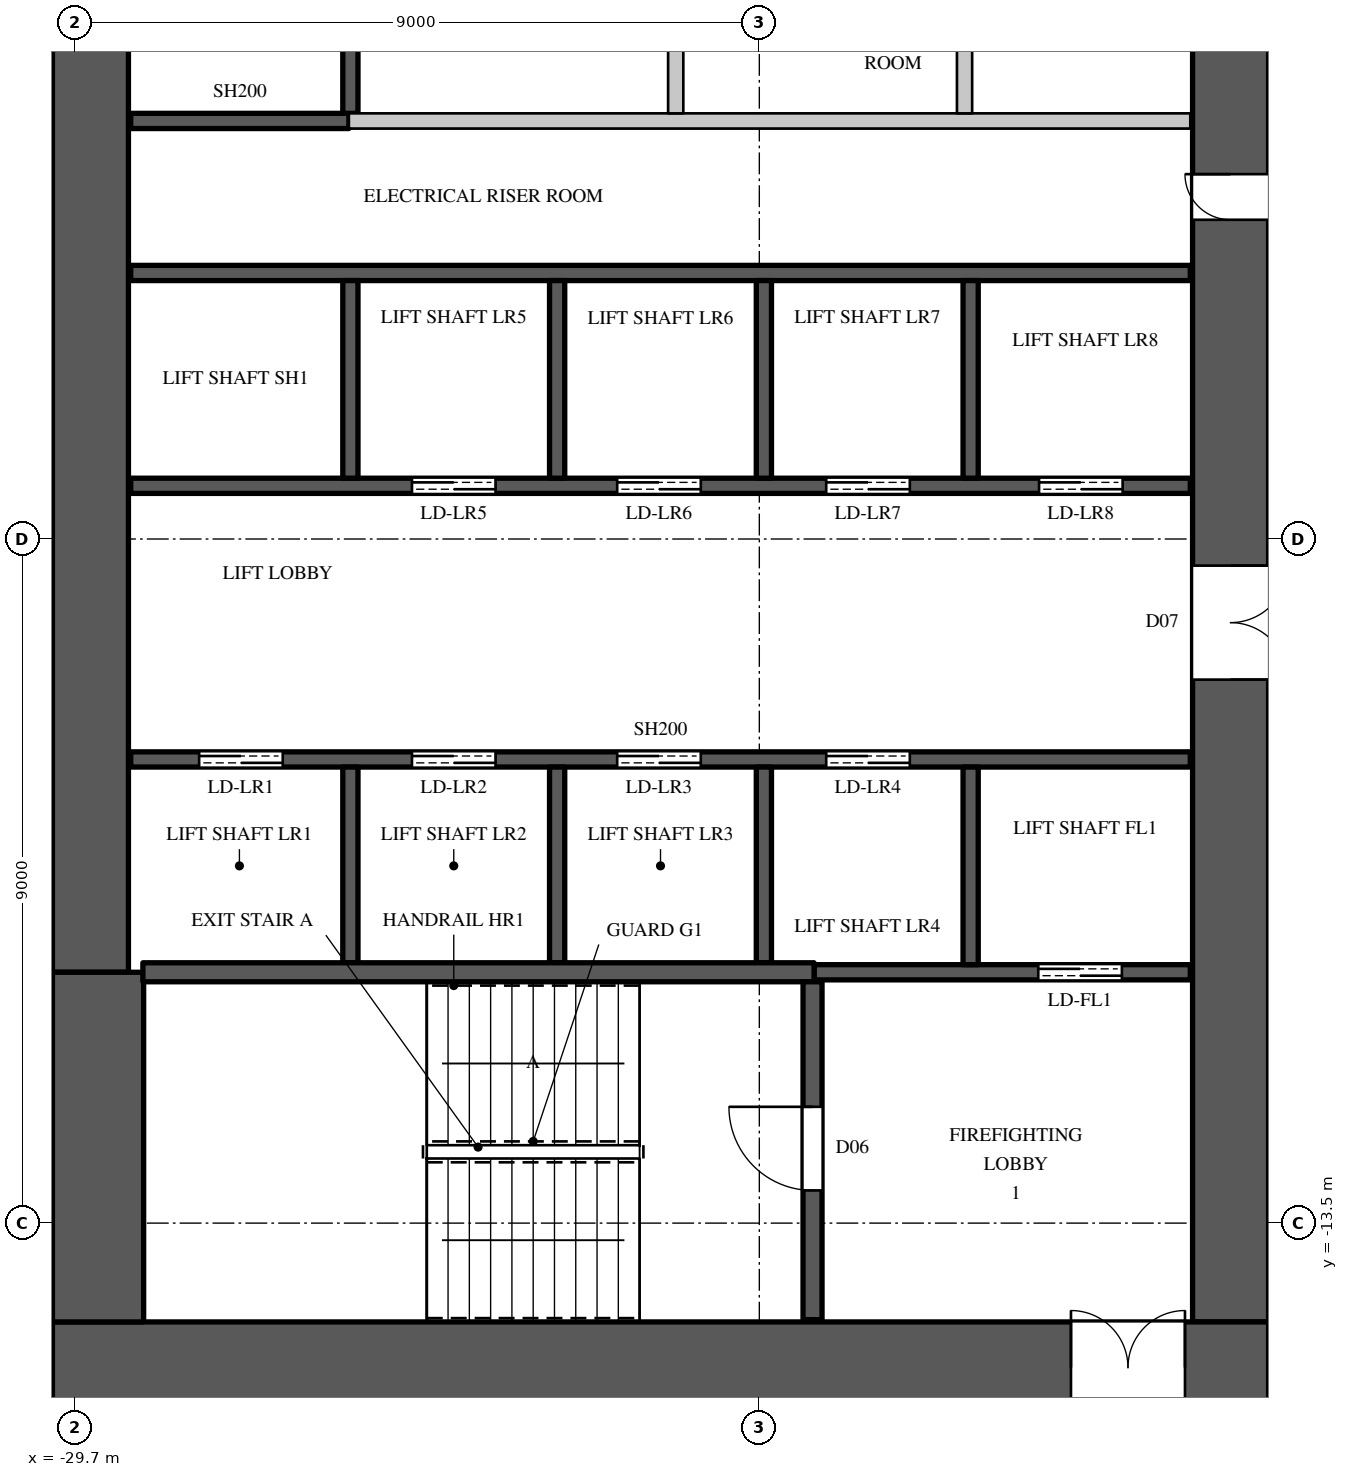
"""IFC4 building model, lengths in metres.
Left out: names, types, materials, properties, quantities, classifications, styles, units other than length and angle.
Written with IfcOpenShell. Run it as: python <this file> out.ifc"""

import sys

from ifc_helpers import new_model, si_unit, direction, frame, frame_2d, origin, place, context, subcontext, project, spatial, rectangle, extrude, element, fill, save


model = new_model("IFC4")
c1 = context("Model", 3, precision=1e-05, world=origin(), true_north=direction((0.0, 1.0)))
c2 = subcontext(c1, "Body", "Model", "MODEL_VIEW")
j1 = project(units=[si_unit("LENGTHUNIT", "METRE"), si_unit("PLANEANGLEUNIT", "RADIAN")], contexts=[c1])
p1 = place(None, origin())
s1 = spatial("IfcSite", under=j1, at=p1, CompositionType="ELEMENT")
p2 = place(p1, origin())
s2 = spatial("IfcBuilding", under=s1, at=p2, CompositionType="ELEMENT")
p3 = place(p2, frame((0.0, 0.0, 91.5)))
s3 = spatial("IfcBuildingStorey", under=s2, at=p3, CompositionType="ELEMENT", Elevation=91.5)
p4 = place(p3, frame((-30.0, -15.4, 0.0), z_axis=(0.0, 0.0, 1.0), x_axis=(1.0, 0.0, 0.0)))
e1 = element("IfcWall", 1, at=p4, inside=s3, PredefinedType="SHEAR", context=c2, shape_type="SweptSolid", body=[
    extrude(rectangle(XDim=16.0, YDim=1.2, at=frame_2d((8.0, 0.0))), origin(), (0.0, 0.0, 1.0), 3.6),
])
p5 = place(p4, frame((13.4, 0.0, 0.0)))
e2 = element("IfcOpeningElement", 2, at=p5, cuts=e1, PredefinedType="OPENING", context=c2, shape_type="SweptSolid", body=[
    extrude(rectangle(XDim=1.5, YDim=2.4, at=frame_2d((0.75, 1.2))), frame((0.0, 0.61, 0.0), z_axis=(0.0, -1.0, 0.0), x_axis=(1.0, 0.0, 0.0)), (0.0, 0.0, 1.0), 1.22),
])
p6 = place(p3, frame((-14.5, -14.8, 0.0), z_axis=(0.0, 0.0, 1.0), x_axis=(0.0, 1.0, 0.0)))
e3 = element("IfcWall", 3, at=p6, inside=s3, PredefinedType="SHEAR", context=c2, shape_type="SweptSolid", body=[
    extrude(rectangle(XDim=29.6, YDim=1.0, at=frame_2d((14.8, 0.0))), origin(), (0.0, 0.0, 1.0), 3.6),
])
p7 = place(p6, frame((8.45, 0.0, 0.0)))
e4 = element("IfcOpeningElement", 4, at=p7, cuts=e3, PredefinedType="OPENING", context=c2, shape_type="SweptSolid", body=[
    extrude(rectangle(XDim=1.5, YDim=2.4, at=frame_2d((0.75, 1.2))), frame((0.0, 0.51, 0.0), z_axis=(0.0, -1.0, 0.0), x_axis=(1.0, 0.0, 0.0)), (0.0, 0.0, 1.0), 1.02),
])
p8 = place(p6, frame((19.65, 0.0, 0.0)))
e5 = element("IfcOpeningElement", 5, at=p8, cuts=e3, PredefinedType="OPENING", context=c2, shape_type="SweptSolid", body=[
    extrude(rectangle(XDim=1.5, YDim=2.4, at=frame_2d((0.75, 1.2))), frame((0.0, 0.51, 0.0), z_axis=(0.0, -1.0, 0.0), x_axis=(1.0, 0.0, 0.0)), (0.0, 0.0, 1.0), 1.02),
])
p9 = place(p6, frame((14.5, 0.0, 0.0)))
e6 = element("IfcOpeningElement", 6, at=p9, cuts=e3, PredefinedType="OPENING", context=c2, shape_type="SweptSolid", body=[
    extrude(rectangle(XDim=0.6, YDim=2.0, at=frame_2d((0.3, 1.0))), frame((0.0, 0.51, 0.0), z_axis=(0.0, -1.0, 0.0), x_axis=(1.0, 0.0, 0.0)), (0.0, 0.0, 1.0), 1.02),
])
p10 = place(p3, frame((-29.5, -10.2, 0.0), z_axis=(0.0, 0.0, 1.0), x_axis=(0.0, 1.0, 0.0)))
e7 = element("IfcWall", 7, at=p10, inside=s3, PredefinedType="SHEAR", context=c2, shape_type="SweptSolid", body=[
    extrude(rectangle(XDim=20.4, YDim=1.0, at=frame_2d((10.2, 0.0))), origin(), (0.0, 0.0, 1.0), 3.6),
])
p11 = place(p3, frame((-29.4, -14.8, 0.0), z_axis=(0.0, 0.0, 1.0), x_axis=(0.0, 1.0, 0.0)))
e8 = element("IfcWall", 8, at=p11, inside=s3, PredefinedType="SHEAR", context=c2, shape_type="SweptSolid", body=[
    extrude(rectangle(XDim=4.6, YDim=1.2, at=frame_2d((2.3, 0.0))), origin(), (0.0, 0.0, 1.0), 3.6),
])
p12 = place(p3, frame((-26.1, 1.0, 0.0), z_axis=(0.0, 0.0, 1.0), x_axis=(1.0, 0.0, 0.0)))
e9 = element("IfcWall", 9, at=p12, inside=s3, PredefinedType="PARTITIONING", context=c2, shape_type="SweptSolid", body=[
    extrude(rectangle(XDim=11.07, YDim=0.2, at=frame_2d((5.535, 0.0))), origin(), (0.0, 0.0, 1.0), 3.3),
])
for number, where, z_axis, x_axis in (
    (10, (-21.8, 1.1, 0.0), (0.0, 0.0, 1.0), (0.0, 1.0, 0.0)),
    (11, (-18.0, 1.1, 0.0), (0.0, 0.0, 1.0), (0.0, 1.0, 0.0)),
):
    element("IfcWall", number, at=place(p3, frame(where, z_axis=z_axis, x_axis=x_axis)), inside=s3, PredefinedType="PARTITIONING", context=c2, shape_type="SweptSolid", body=[
        extrude(rectangle(XDim=2.6, YDim=0.2, at=frame_2d((1.3, 0.0))), origin(), (0.0, 0.0, 1.0), 3.3),
    ])
p13 = place(p3, frame((-28.97, -7.4, 0.0), z_axis=(0.0, 0.0, 1.0), x_axis=(1.0, 0.0, 0.0)))
e12 = element("IfcWall", 12, at=p13, inside=s3, PredefinedType="SHEAR", context=c2, shape_type="SweptSolid", body=[
    extrude(rectangle(XDim=13.94, YDim=0.2, at=frame_2d((6.97, 0.0))), origin(), (0.0, 0.0, 1.0), 3.3),
])
p14 = place(p13, frame((0.9, 0.0, 0.0)))
e13 = element("IfcOpeningElement", 13, at=p14, cuts=e12, PredefinedType="OPENING", context=c2, shape_type="SweptSolid", body=[
    extrude(rectangle(XDim=1.1, YDim=2.2, at=frame_2d((0.55, 1.1))), frame((0.0, 0.11, 0.0), z_axis=(0.0, -1.0, 0.0), x_axis=(1.0, 0.0, 0.0)), (0.0, 0.0, 1.0), 0.22),
])
p15 = place(p13, frame((3.7, 0.0, 0.0)))
e14 = element("IfcOpeningElement", 14, at=p15, cuts=e12, PredefinedType="OPENING", context=c2, shape_type="SweptSolid", body=[
    extrude(rectangle(XDim=1.1, YDim=2.2, at=frame_2d((0.55, 1.1))), frame((0.0, 0.11, 0.0), z_axis=(0.0, -1.0, 0.0), x_axis=(1.0, 0.0, 0.0)), (0.0, 0.0, 1.0), 0.22),
])
p16 = place(p13, frame((6.4, 0.0, 0.0)))
e15 = element("IfcOpeningElement", 15, at=p16, cuts=e12, PredefinedType="OPENING", context=c2, shape_type="SweptSolid", body=[
    extrude(rectangle(XDim=1.1, YDim=2.2, at=frame_2d((0.55, 1.1))), frame((0.0, 0.11, 0.0), z_axis=(0.0, -1.0, 0.0), x_axis=(1.0, 0.0, 0.0)), (0.0, 0.0, 1.0), 0.22),
])
p17 = place(p13, frame((9.15, 0.0, 0.0)))
e16 = element("IfcOpeningElement", 16, at=p17, cuts=e12, PredefinedType="OPENING", context=c2, shape_type="SweptSolid", body=[
    extrude(rectangle(XDim=1.1, YDim=2.2, at=frame_2d((0.55, 1.1))), frame((0.0, 0.11, 0.0), z_axis=(0.0, -1.0, 0.0), x_axis=(1.0, 0.0, 0.0)), (0.0, 0.0, 1.0), 0.22),
])
p18 = place(p3, frame((-28.97, -3.8, 0.0), z_axis=(0.0, 0.0, 1.0), x_axis=(1.0, 0.0, 0.0)))
e17 = element("IfcWall", 17, at=p18, inside=s3, PredefinedType="SHEAR", context=c2, shape_type="SweptSolid", body=[
    extrude(rectangle(XDim=13.94, YDim=0.2, at=frame_2d((6.97, 0.0))), origin(), (0.0, 0.0, 1.0), 3.3),
])
p19 = place(p18, frame((3.7, 0.0, 0.0)))
e18 = element("IfcOpeningElement", 18, at=p19, cuts=e17, PredefinedType="OPENING", context=c2, shape_type="SweptSolid", body=[
    extrude(rectangle(XDim=1.1, YDim=2.2, at=frame_2d((0.55, 1.1))), frame((0.0, 0.11, 0.0), z_axis=(0.0, -1.0, 0.0), x_axis=(1.0, 0.0, 0.0)), (0.0, 0.0, 1.0), 0.22),
])
p20 = place(p18, frame((6.4, 0.0, 0.0)))
e19 = element("IfcOpeningElement", 19, at=p20, cuts=e17, PredefinedType="OPENING", context=c2, shape_type="SweptSolid", body=[
    extrude(rectangle(XDim=1.1, YDim=2.2, at=frame_2d((0.55, 1.1))), frame((0.0, 0.11, 0.0), z_axis=(0.0, -1.0, 0.0), x_axis=(1.0, 0.0, 0.0)), (0.0, 0.0, 1.0), 0.22),
])
p21 = place(p18, frame((9.15, 0.0, 0.0)))
e20 = element("IfcOpeningElement", 20, at=p21, cuts=e17, PredefinedType="OPENING", context=c2, shape_type="SweptSolid", body=[
    extrude(rectangle(XDim=1.1, YDim=2.2, at=frame_2d((0.55, 1.1))), frame((0.0, 0.11, 0.0), z_axis=(0.0, -1.0, 0.0), x_axis=(1.0, 0.0, 0.0)), (0.0, 0.0, 1.0), 0.22),
])
p22 = place(p18, frame((11.95, 0.0, 0.0)))
e21 = element("IfcOpeningElement", 21, at=p22, cuts=e17, PredefinedType="OPENING", context=c2, shape_type="SweptSolid", body=[
    extrude(rectangle(XDim=1.1, YDim=2.2, at=frame_2d((0.55, 1.1))), frame((0.0, 0.11, 0.0), z_axis=(0.0, -1.0, 0.0), x_axis=(1.0, 0.0, 0.0)), (0.0, 0.0, 1.0), 0.22),
])
p23 = place(p3, frame((-28.97, -1.0, 0.0), z_axis=(0.0, 0.0, 1.0), x_axis=(1.0, 0.0, 0.0)))
e22 = element("IfcWall", 22, at=p23, inside=s3, PredefinedType="SHEAR", context=c2, shape_type="SweptSolid", body=[
    extrude(rectangle(XDim=13.94, YDim=0.2, at=frame_2d((6.97, 0.0))), origin(), (0.0, 0.0, 1.0), 3.3),
])
p24 = place(p3, frame((-28.97, 1.0, 0.0), z_axis=(0.0, 0.0, 1.0), x_axis=(1.0, 0.0, 0.0)))
e23 = element("IfcWall", 23, at=p24, inside=s3, PredefinedType="SHEAR", context=c2, shape_type="SweptSolid", body=[
    extrude(rectangle(XDim=2.87, YDim=0.2, at=frame_2d((1.435, 0.0))), origin(), (0.0, 0.0, 1.0), 3.3),
])
p25 = place(p3, frame((-26.08, -10.075, 0.0), z_axis=(0.0, 0.0, 1.0), x_axis=(0.0, 1.0, 0.0)))
e24 = element("IfcWall", 24, at=p25, inside=s3, PredefinedType="SHEAR", context=c2, shape_type="SweptSolid", body=[
    extrude(rectangle(XDim=2.575, YDim=0.2, at=frame_2d((1.288, 0.0))), origin(), (0.0, 0.0, 1.0), 3.6),
])
p26 = place(p3, frame((-26.08, -3.7, 0.0), z_axis=(0.0, 0.0, 1.0), x_axis=(0.0, 1.0, 0.0)))
e25 = element("IfcWall", 25, at=p26, inside=s3, PredefinedType="SHEAR", context=c2, shape_type="SweptSolid", body=[
    extrude(rectangle(XDim=2.6, YDim=0.2, at=frame_2d((1.3, 0.0))), origin(), (0.0, 0.0, 1.0), 3.6),
])
p27 = place(p3, frame((-26.08, 1.1, 0.0), z_axis=(0.0, 0.0, 1.0), x_axis=(0.0, 1.0, 0.0)))
e26 = element("IfcWall", 26, at=p27, inside=s3, PredefinedType="SHEAR", context=c2, shape_type="SweptSolid", body=[
    extrude(rectangle(XDim=2.6, YDim=0.2, at=frame_2d((1.3, 0.0))), origin(), (0.0, 0.0, 1.0), 3.3),
])
p28 = place(p3, frame((-23.36, -10.075, 0.0), z_axis=(0.0, 0.0, 1.0), x_axis=(0.0, 1.0, 0.0)))
e27 = element("IfcWall", 27, at=p28, inside=s3, PredefinedType="SHEAR", context=c2, shape_type="SweptSolid", body=[
    extrude(rectangle(XDim=2.575, YDim=0.2, at=frame_2d((1.288, 0.0))), origin(), (0.0, 0.0, 1.0), 3.6),
])
p29 = place(p3, frame((-23.36, -3.7, 0.0), z_axis=(0.0, 0.0, 1.0), x_axis=(0.0, 1.0, 0.0)))
e28 = element("IfcWall", 28, at=p29, inside=s3, PredefinedType="SHEAR", context=c2, shape_type="SweptSolid", body=[
    extrude(rectangle(XDim=2.6, YDim=0.2, at=frame_2d((1.3, 0.0))), origin(), (0.0, 0.0, 1.0), 3.6),
])
p30 = place(p3, frame((-20.64, -10.075, 0.0), z_axis=(0.0, 0.0, 1.0), x_axis=(0.0, 1.0, 0.0)))
e29 = element("IfcWall", 29, at=p30, inside=s3, PredefinedType="SHEAR", context=c2, shape_type="SweptSolid", body=[
    extrude(rectangle(XDim=2.575, YDim=0.2, at=frame_2d((1.288, 0.0))), origin(), (0.0, 0.0, 1.0), 3.6),
])
p31 = place(p3, frame((-20.64, -3.7, 0.0), z_axis=(0.0, 0.0, 1.0), x_axis=(0.0, 1.0, 0.0)))
e30 = element("IfcWall", 30, at=p31, inside=s3, PredefinedType="SHEAR", context=c2, shape_type="SweptSolid", body=[
    extrude(rectangle(XDim=2.6, YDim=0.2, at=frame_2d((1.3, 0.0))), origin(), (0.0, 0.0, 1.0), 3.6),
])
p32 = place(p3, frame((-19.98, -10.2, 0.0), z_axis=(0.0, 0.0, 1.0), x_axis=(1.0, 0.0, 0.0)))
e31 = element("IfcWall", 31, at=p32, inside=s3, PredefinedType="SHEAR", context=c2, shape_type="SweptSolid", body=[
    extrude(rectangle(XDim=4.95, YDim=0.2, at=frame_2d((2.475, 0.0))), origin(), (0.0, 0.0, 1.0), 3.3),
])
p33 = place(p32, frame((2.95, 0.0, 0.0)))
e32 = element("IfcOpeningElement", 32, at=p33, cuts=e31, PredefinedType="OPENING", context=c2, shape_type="SweptSolid", body=[
    extrude(rectangle(XDim=1.1, YDim=2.2, at=frame_2d((0.55, 1.1))), frame((0.0, 0.11, 0.0), z_axis=(0.0, -1.0, 0.0), x_axis=(1.0, 0.0, 0.0)), (0.0, 0.0, 1.0), 0.22),
])
p34 = place(p3, frame((-17.92, -10.1, 0.0), z_axis=(0.0, 0.0, 1.0), x_axis=(0.0, 1.0, 0.0)))
e33 = element("IfcWall", 33, at=p34, inside=s3, PredefinedType="SHEAR", context=c2, shape_type="SweptSolid", body=[
    extrude(rectangle(XDim=2.6, YDim=0.2, at=frame_2d((1.3, 0.0))), origin(), (0.0, 0.0, 1.0), 3.6),
])
p35 = place(p3, frame((-17.92, -3.7, 0.0), z_axis=(0.0, 0.0, 1.0), x_axis=(0.0, 1.0, 0.0)))
e34 = element("IfcWall", 34, at=p35, inside=s3, PredefinedType="SHEAR", context=c2, shape_type="SweptSolid", body=[
    extrude(rectangle(XDim=2.6, YDim=0.2, at=frame_2d((1.3, 0.0))), origin(), (0.0, 0.0, 1.0), 3.6),
])
p36 = place(p3, frame((-28.81, -10.2, 0.0), z_axis=(0.0, 0.0, 1.0), x_axis=(1.0, 0.0, 0.0)))
e35 = element("IfcWall", 35, at=p36, inside=s3, PredefinedType="SHEAR", context=c2, shape_type="SweptSolid", body=[
    extrude(rectangle(XDim=8.83, YDim=0.25, at=frame_2d((4.415, 0.0))), origin(), (0.0, 0.0, 1.0), 3.3),
])
p37 = place(p3, frame((-20.0, -14.77, 0.0), z_axis=(0.0, 0.0, 1.0), x_axis=(0.0, 1.0, 0.0)))
e36 = element("IfcWall", 36, at=p37, inside=s3, PredefinedType="SHEAR", context=c2, shape_type="SweptSolid", body=[
    extrude(rectangle(XDim=4.445, YDim=0.25, at=frame_2d((2.223, 0.0))), origin(), (0.0, 0.0, 1.0), 3.3),
])
p38 = place(p37, frame((1.7, 0.0, 0.0)))
e37 = element("IfcOpeningElement", 37, at=p38, cuts=e36, PredefinedType="OPENING", context=c2, shape_type="SweptSolid", body=[
    extrude(rectangle(XDim=1.1, YDim=2.2, at=frame_2d((0.55, 1.1))), frame((0.0, 0.135, 0.0), z_axis=(0.0, -1.0, 0.0), x_axis=(1.0, 0.0, 0.0)), (0.0, 0.0, 1.0), 0.27),
])
p39 = place(p38, origin())
e38 = element("IfcDoor", 38, at=p39, inside=s3, OperationType="SINGLE_SWING_RIGHT", PredefinedType="DOOR", context=c2, shape_type="SweptSolid", body=[
    extrude(rectangle(XDim=1.1, YDim=2.2, at=frame_2d((0.55, 1.1))), frame((0.0, 0.025, 0.0), z_axis=(0.0, -1.0, 0.0), x_axis=(1.0, 0.0, 0.0)), (0.0, 0.0, 1.0), 0.05),
])
fill(e37, e38)
p40 = place(p14, origin())
e39 = element("IfcDoor", 39, at=p40, inside=s3, OperationType="DOUBLE_DOOR_SLIDING", PredefinedType="DOOR", context=c2, shape_type="SweptSolid", body=[
    extrude(rectangle(XDim=1.1, YDim=2.2, at=frame_2d((0.55, 1.1))), frame((0.0, 0.025, 0.0), z_axis=(0.0, -1.0, 0.0), x_axis=(1.0, 0.0, 0.0)), (0.0, 0.0, 1.0), 0.05),
])
fill(e13, e39)
p41 = place(p15, origin())
e40 = element("IfcDoor", 40, at=p41, inside=s3, OperationType="DOUBLE_DOOR_SLIDING", PredefinedType="DOOR", context=c2, shape_type="SweptSolid", body=[
    extrude(rectangle(XDim=1.1, YDim=2.2, at=frame_2d((0.55, 1.1))), frame((0.0, 0.025, 0.0), z_axis=(0.0, -1.0, 0.0), x_axis=(1.0, 0.0, 0.0)), (0.0, 0.0, 1.0), 0.05),
])
fill(e14, e40)
p42 = place(p16, origin())
e41 = element("IfcDoor", 41, at=p42, inside=s3, OperationType="DOUBLE_DOOR_SLIDING", PredefinedType="DOOR", context=c2, shape_type="SweptSolid", body=[
    extrude(rectangle(XDim=1.1, YDim=2.2, at=frame_2d((0.55, 1.1))), frame((0.0, 0.025, 0.0), z_axis=(0.0, -1.0, 0.0), x_axis=(1.0, 0.0, 0.0)), (0.0, 0.0, 1.0), 0.05),
])
fill(e15, e41)
p43 = place(p17, origin())
e42 = element("IfcDoor", 42, at=p43, inside=s3, OperationType="DOUBLE_DOOR_SLIDING", PredefinedType="DOOR", context=c2, shape_type="SweptSolid", body=[
    extrude(rectangle(XDim=1.1, YDim=2.2, at=frame_2d((0.55, 1.1))), frame((0.0, 0.025, 0.0), z_axis=(0.0, -1.0, 0.0), x_axis=(1.0, 0.0, 0.0)), (0.0, 0.0, 1.0), 0.05),
])
fill(e16, e42)
p44 = place(p33, origin())
e43 = element("IfcDoor", 43, at=p44, inside=s3, OperationType="DOUBLE_DOOR_SLIDING", PredefinedType="DOOR", context=c2, shape_type="SweptSolid", body=[
    extrude(rectangle(XDim=1.1, YDim=2.2, at=frame_2d((0.55, 1.1))), frame((0.0, 0.025, 0.0), z_axis=(0.0, -1.0, 0.0), x_axis=(1.0, 0.0, 0.0)), (0.0, 0.0, 1.0), 0.05),
])
fill(e32, e43)
p45 = place(p19, origin())
e44 = element("IfcDoor", 44, at=p45, inside=s3, OperationType="DOUBLE_DOOR_SLIDING", PredefinedType="DOOR", context=c2, shape_type="SweptSolid", body=[
    extrude(rectangle(XDim=1.1, YDim=2.2, at=frame_2d((0.55, 1.1))), frame((0.0, 0.025, 0.0), z_axis=(0.0, -1.0, 0.0), x_axis=(1.0, 0.0, 0.0)), (0.0, 0.0, 1.0), 0.05),
])
fill(e18, e44)
p46 = place(p20, origin())
e45 = element("IfcDoor", 45, at=p46, inside=s3, OperationType="DOUBLE_DOOR_SLIDING", PredefinedType="DOOR", context=c2, shape_type="SweptSolid", body=[
    extrude(rectangle(XDim=1.1, YDim=2.2, at=frame_2d((0.55, 1.1))), frame((0.0, 0.025, 0.0), z_axis=(0.0, -1.0, 0.0), x_axis=(1.0, 0.0, 0.0)), (0.0, 0.0, 1.0), 0.05),
])
fill(e19, e45)
p47 = place(p21, origin())
e46 = element("IfcDoor", 46, at=p47, inside=s3, OperationType="DOUBLE_DOOR_SLIDING", PredefinedType="DOOR", context=c2, shape_type="SweptSolid", body=[
    extrude(rectangle(XDim=1.1, YDim=2.2, at=frame_2d((0.55, 1.1))), frame((0.0, 0.025, 0.0), z_axis=(0.0, -1.0, 0.0), x_axis=(1.0, 0.0, 0.0)), (0.0, 0.0, 1.0), 0.05),
])
fill(e20, e46)
p48 = place(p22, origin())
e47 = element("IfcDoor", 47, at=p48, inside=s3, OperationType="DOUBLE_DOOR_SLIDING", PredefinedType="DOOR", context=c2, shape_type="SweptSolid", body=[
    extrude(rectangle(XDim=1.1, YDim=2.2, at=frame_2d((0.55, 1.1))), frame((0.0, 0.025, 0.0), z_axis=(0.0, -1.0, 0.0), x_axis=(1.0, 0.0, 0.0)), (0.0, 0.0, 1.0), 0.05),
])
fill(e21, e47)
p49 = place(p5, origin())
e48 = element("IfcDoor", 48, at=p49, inside=s3, OperationType="DOUBLE_DOOR_SINGLE_SWING", PredefinedType="DOOR", context=c2, shape_type="SweptSolid", body=[
    extrude(rectangle(XDim=1.5, YDim=2.4, at=frame_2d((0.75, 1.2))), frame((0.0, 0.025, 0.0), z_axis=(0.0, -1.0, 0.0), x_axis=(1.0, 0.0, 0.0)), (0.0, 0.0, 1.0), 0.05),
])
fill(e2, e48)
p50 = place(p7, origin())
e49 = element("IfcDoor", 49, at=p50, inside=s3, OperationType="DOUBLE_DOOR_SINGLE_SWING", PredefinedType="DOOR", context=c2, shape_type="SweptSolid", body=[
    extrude(rectangle(XDim=1.5, YDim=2.4, at=frame_2d((0.75, 1.2))), frame((0.0, -0.445, 0.0), z_axis=(0.0, -1.0, 0.0), x_axis=(1.0, 0.0, 0.0)), (0.0, 0.0, 1.0), 0.05),
])
fill(e4, e49)
p51 = place(p9, origin())
e50 = element("IfcDoor", 50, at=p51, inside=s3, OperationType="SINGLE_SWING_RIGHT", PredefinedType="DOOR", context=c2, shape_type="SweptSolid", body=[
    extrude(rectangle(XDim=0.6, YDim=2.0, at=frame_2d((0.3, 1.0))), frame((0.0, 0.495, 0.0), z_axis=(0.0, -1.0, 0.0), x_axis=(1.0, 0.0, 0.0)), (0.0, 0.0, 1.0), 0.05),
])
fill(e6, e50)
save(model, sys.argv[1])
